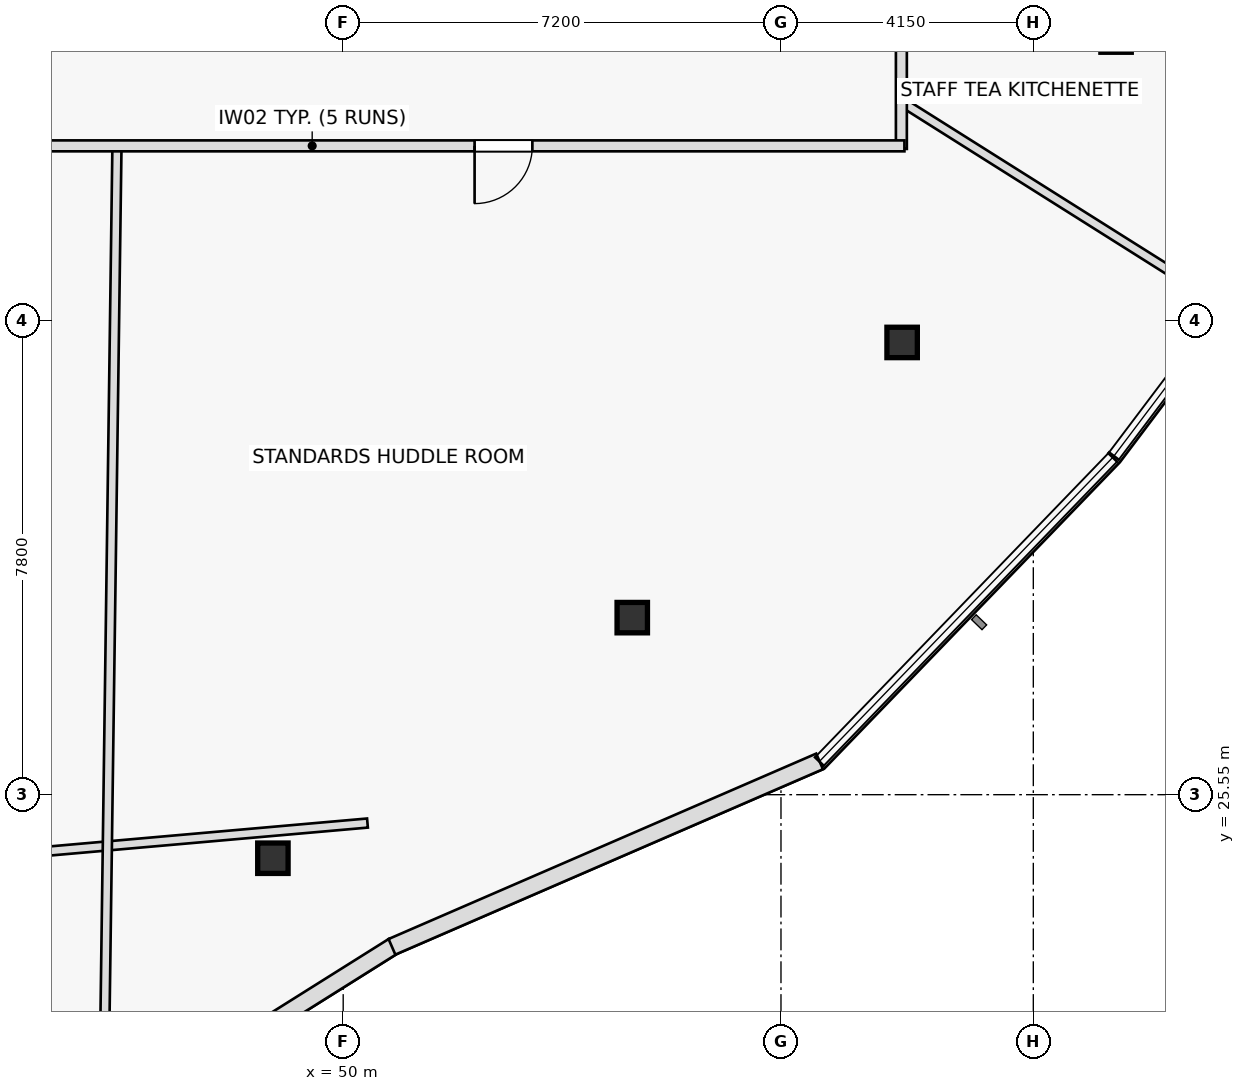
"""IFC4 building model, lengths in metres.
Left out: names, types, materials, properties, quantities, classifications, styles, units other than length and angle.
Written with IfcOpenShell. Run it as: python <this file> out.ifc"""

import sys

from ifc_helpers import new_model, si_unit, direction, frame, frame_2d, origin, origin_2d, place, context, subcontext, project, spatial, rectangle, hollow_rectangle, extrude, element, fill, save


model = new_model("IFC4")
c1 = context("Model", 3, precision=1e-05, world=origin(), true_north=direction((0.0, 1.0)))
c2 = subcontext(c1, "Body", "Model", "MODEL_VIEW")
j1 = project(units=[si_unit("LENGTHUNIT", "METRE"), si_unit("PLANEANGLEUNIT", "RADIAN")], contexts=[c1])
p1 = place(None, origin())
s1 = spatial("IfcSite", under=j1, at=p1, CompositionType="ELEMENT")
p2 = place(p1, origin())
s2 = spatial("IfcBuilding", under=s1, at=p2, CompositionType="ELEMENT")
p3 = place(p2, frame((0.0, 0.0, 249.8)))
s3 = spatial("IfcBuildingStorey", under=s2, at=p3, CompositionType="ELEMENT", Elevation=249.8)
for number, where, z_axis, x_axis in (
    (1, (48.844, 24.505, 0.0), (0.0, 0.0, 1.0), (1.0, 0.0, 0.0)),
    (2, (54.754, 28.462, 0.0), (0.0, 0.0, 1.0), (1.0, 0.0, 0.0)),
    (3, (59.192, 32.987, 0.0), (0.0, 0.0, 1.0), (1.0, 0.0, 0.0)),
    (4, (62.711, 38.009, 0.0), (0.0, 0.0, 1.0), (1.0, 0.0, 0.0)),
):
    element("IfcColumn", number, at=place(p3, frame(where, z_axis=z_axis, x_axis=x_axis)), inside=s3, PredefinedType="COLUMN", context=c2, shape_type="SweptSolid", body=[
        extrude(hollow_rectangle(XDim=0.5, YDim=0.5, WallThickness=0.03, at=origin_2d()), origin(), (0.0, 0.0, 1.0), 3.65),
    ])
p4 = place(p3, frame((39.808, 24.152, 0.0), z_axis=(0.0, 0.0, 1.0), x_axis=(0.996153584085, 0.087624408208, 0.0)))
e5 = element("IfcWall", 5, at=p4, inside=s3, PredefinedType="PARTITIONING", context=c2, shape_type="SweptSolid", body=[
    extrude(rectangle(XDim=10.632, YDim=0.15, at=frame_2d((5.316, 0.0))), origin(), (0.0, 0.0, 1.0), 3.175),
])
p5 = place(p3, frame((46.279, 36.22, 0.0), z_axis=(0.0, 0.0, 1.0), x_axis=(-0.013742019397, -0.999905573993, 0.0)))
e6 = element("IfcWall", 6, at=p5, inside=s3, PredefinedType="PARTITIONING", context=c2, shape_type="SweptSolid", body=[
    extrude(rectangle(XDim=16.167, YDim=0.15, at=frame_2d((8.083, 0.0))), origin(), (0.0, 0.0, 1.0), 3.075),
])
p6 = place(p3, frame((59.18, 36.946, 0.0), z_axis=(0.0, 0.0, 1.0), x_axis=(0.846029953898, -0.533135364713, 0.0)))
e7 = element("IfcWall", 7, at=p6, inside=s3, PredefinedType="PARTITIONING", context=c2, shape_type="SweptSolid", body=[
    extrude(rectangle(XDim=6.332, YDim=0.15, at=frame_2d((3.166, 0.0))), origin(), (0.0, 0.0, 1.0), 3.175),
])
p7 = place(p3, frame((59.18, 41.1, 0.0), z_axis=(0.0, 0.0, 1.0), x_axis=(0.0, -1.0, 0.0)))
e8 = element("IfcWall", 8, at=p7, inside=s3, PredefinedType="PARTITIONING", context=c2, shape_type="SweptSolid", body=[
    extrude(rectangle(XDim=4.93, YDim=0.18, at=frame_2d((2.465, 0.0))), origin(), (0.0, 0.0, 1.0), 3.355),
])
p8 = place(p7, frame((1.748, 0.0, 0.0)))
e9 = element("IfcOpeningElement", 9, at=p8, cuts=e8, PredefinedType="OPENING", context=c2, shape_type="SweptSolid", body=[
    extrude(rectangle(XDim=0.95, YDim=2.05, at=frame_2d((0.475, 1.025))), frame((0.0, 0.1, 0.0), z_axis=(0.0, -1.0, 0.0), x_axis=(1.0, 0.0, 0.0)), (0.0, 0.0, 1.0), 0.2),
])
p9 = place(p3, frame((59.23, 36.22, 0.0), z_axis=(0.0, 0.0, 1.0), x_axis=(-1.0, 0.0, 0.0)))
e10 = element("IfcWall", 10, at=p9, inside=s3, PredefinedType="PARTITIONING", context=c2, shape_type="SweptSolid", body=[
    extrude(rectangle(XDim=19.48, YDim=0.18, at=frame_2d((9.74, 0.0))), origin(), (0.0, 0.0, 1.0), 3.075),
])
p10 = place(p9, frame((6.119, 0.0, 0.0)))
e11 = element("IfcOpeningElement", 11, at=p10, cuts=e10, PredefinedType="OPENING", context=c2, shape_type="SweptSolid", body=[
    extrude(rectangle(XDim=0.95, YDim=2.05, at=frame_2d((0.475, 1.025))), frame((0.0, 0.1, 0.0), z_axis=(0.0, -1.0, 0.0), x_axis=(1.0, 0.0, 0.0)), (0.0, 0.0, 1.0), 0.2),
])
p11 = place(p9, frame((14.639, 0.0, 0.0)))
e12 = element("IfcOpeningElement", 12, at=p11, cuts=e10, PredefinedType="OPENING", context=c2, shape_type="SweptSolid", body=[
    extrude(rectangle(XDim=0.95, YDim=2.05, at=frame_2d((0.475, 1.025))), frame((0.0, 0.1, 0.0), z_axis=(0.0, -1.0, 0.0), x_axis=(1.0, 0.0, 0.0)), (0.0, 0.0, 1.0), 0.2),
])
p12 = place(p9, frame((17.795, 0.0, 0.0)))
e13 = element("IfcOpeningElement", 13, at=p12, cuts=e10, PredefinedType="OPENING", context=c2, shape_type="SweptSolid", body=[
    extrude(rectangle(XDim=0.95, YDim=2.05, at=frame_2d((0.475, 1.025))), frame((0.0, 0.1, 0.0), z_axis=(0.0, -1.0, 0.0), x_axis=(1.0, 0.0, 0.0)), (0.0, 0.0, 1.0), 0.2),
])
p13 = place(p3, frame((44.872, 19.322, 0.0), z_axis=(0.0, 0.0, 1.0), x_axis=(0.846910346194, 0.531735710207, 0.0)))
e14 = element("IfcWall", 14, at=p13, inside=s3, PredefinedType="STANDARD", context=c2, shape_type="SweptSolid", body=[
    extrude(rectangle(XDim=7.033, YDim=0.28, at=frame_2d((3.517, 0.0))), origin(), (0.0, 0.0, 1.0), 3.65),
])
p14 = place(p3, frame((50.802, 23.048, 0.0), z_axis=(0.0, 0.0, 1.0), x_axis=(0.917486281517, 0.397767423538, 0.0)))
e15 = element("IfcWall", 15, at=p14, inside=s3, PredefinedType="STANDARD", context=c2, shape_type="SweptSolid", body=[
    extrude(rectangle(XDim=7.666, YDim=0.28, at=frame_2d((3.833, 0.0))), origin(), (0.0, 0.0, 1.0), 3.65),
])
p15 = place(p10, origin())
e16 = element("IfcDoor", 16, at=p15, inside=s3, OperationType="SINGLE_SWING_RIGHT", PredefinedType="DOOR", context=c2, shape_type="SweptSolid", body=[
    extrude(rectangle(XDim=0.95, YDim=2.05, at=frame_2d((0.475, 1.025))), frame((0.0, 0.025, 0.0), z_axis=(0.0, -1.0, 0.0), x_axis=(1.0, 0.0, 0.0)), (0.0, 0.0, 1.0), 0.05),
])
fill(e11, e16)
save(model, sys.argv[1])
